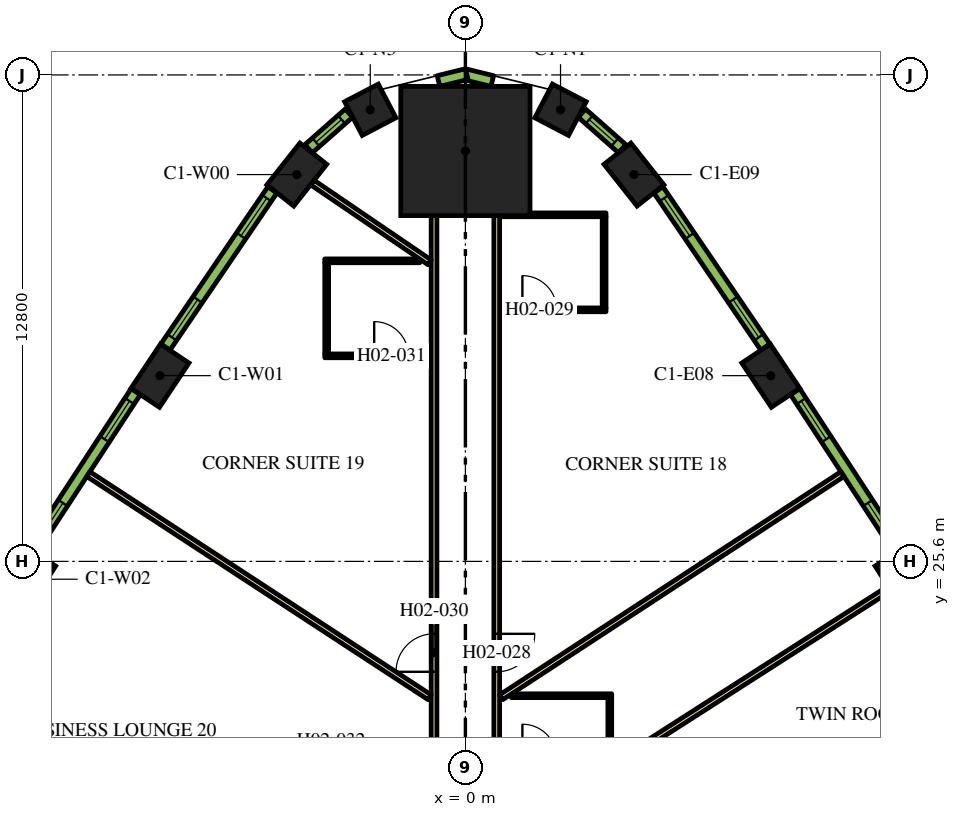
"""IFC4 building model, lengths in metres.
Left out: names, types, materials, properties, quantities, classifications, styles, units other than length and angle.
Written with IfcOpenShell. Run it as: python <this file> out.ifc"""

import sys

from ifc_helpers import new_model, si_unit, direction, frame, frame_2d, origin, origin_2d, place, context, subcontext, project, spatial, rectangle, extrude, element, fill, save


model = new_model("IFC4")
c1 = context("Model", 3, precision=1e-05, world=origin(), true_north=direction((0.0, 1.0)))
c2 = subcontext(c1, "Body", "Model", "MODEL_VIEW")
j1 = project(units=[si_unit("LENGTHUNIT", "METRE"), si_unit("PLANEANGLEUNIT", "RADIAN")], contexts=[c1])
p1 = place(None, origin())
s1 = spatial("IfcSite", under=j1, at=p1, CompositionType="ELEMENT")
p2 = place(p1, origin())
s2 = spatial("IfcBuilding", under=s1, at=p2, CompositionType="ELEMENT")
p3 = place(p2, frame((0.0, 0.0, 43.2)))
s3 = spatial("IfcBuildingStorey", under=s2, at=p3, CompositionType="ELEMENT", Elevation=43.2)
p4 = place(p3, frame((0.0, 36.399, 0.0), z_axis=(0.0, 0.0, 1.0), x_axis=(0.0, 1.0, 0.0)))
e1 = element("IfcColumn", 1, at=p4, inside=s3, PredefinedType="COLUMN", context=c2, shape_type="SweptSolid", body=[
    extrude(rectangle(XDim=3.4, YDim=3.4, at=origin_2d()), origin(), (0.0, 0.0, 1.0), 3.9),
])
for number, where, z_axis, x_axis in (
    (2, (11.539, 25.131, 0.0), (0.0, 0.0, 1.0), (-0.539, 0.842, 0.0)),
    (3, (8.037, 30.487, 0.0), (0.0, 0.0, 1.0), (-0.555, 0.832, 0.0)),
    (4, (4.436, 35.778, 0.0), (0.0, 0.0, 1.0), (-0.62, 0.784, 0.0)),
):
    element("IfcColumn", number, at=place(p3, frame(where, z_axis=z_axis, x_axis=x_axis)), inside=s3, PredefinedType="COLUMN", context=c2, shape_type="SweptSolid", body=[
        extrude(rectangle(XDim=1.4, YDim=0.9, at=origin_2d()), origin(), (0.0, 0.0, 1.0), 3.9),
    ])
for number, where, z_axis, x_axis in (
    (5, (2.503, 37.484, 0.0), (0.0, 0.0, 1.0), (-0.886, 0.464, 0.0)),
    (6, (-2.503, 37.484, 0.0), (0.0, 0.0, 1.0), (-0.886, -0.464, 0.0)),
):
    element("IfcColumn", number, at=place(p3, frame(where, z_axis=z_axis, x_axis=x_axis)), inside=s3, PredefinedType="COLUMN", context=c2, shape_type="SweptSolid", body=[
        extrude(rectangle(XDim=1.0, YDim=1.0, at=origin_2d()), origin(), (0.0, 0.0, 1.0), 3.9),
    ])
for number, where, z_axis, x_axis in (
    (7, (-4.436, 35.778, 0.0), (0.0, 0.0, 1.0), (-0.62, -0.784, 0.0)),
    (8, (-8.037, 30.487, 0.0), (0.0, 0.0, 1.0), (-0.555, -0.832, 0.0)),
    (9, (-11.539, 25.131, 0.0), (0.0, 0.0, 1.0), (-0.539, -0.842, 0.0)),
):
    element("IfcColumn", number, at=place(p3, frame(where, z_axis=z_axis, x_axis=x_axis)), inside=s3, PredefinedType="COLUMN", context=c2, shape_type="SweptSolid", body=[
        extrude(rectangle(XDim=1.4, YDim=0.9, at=origin_2d()), origin(), (0.0, 0.0, 1.0), 3.9),
    ])
p5 = place(p3, frame((0.825, 34.699, 0.0), z_axis=(0.0, 0.0, 1.0), x_axis=(0.0, -1.0, 0.0)))
e10 = element("IfcWall", 10, at=p5, inside=s3, PredefinedType="PARTITIONING", context=c2, shape_type="SweptSolid", body=[
    extrude(rectangle(XDim=16.144, YDim=0.15, at=frame_2d((8.072, 0.0))), origin(), (0.0, 0.0, 1.0), 2.75),
])
p6 = place(p5, frame((14.714, 0.0, 0.0)))
e11 = element("IfcOpeningElement", 11, at=p6, cuts=e10, PredefinedType="OPENING", context=c2, shape_type="SweptSolid", body=[
    extrude(rectangle(XDim=1.0, YDim=2.1, at=frame_2d((0.5, 1.05))), frame((0.0, 0.085, 0.0), z_axis=(0.0, -1.0, 0.0), x_axis=(1.0, 0.0, 0.0)), (0.0, 0.0, 1.0), 0.17),
])
p7 = place(p5, frame((11.005, 0.0, 0.0)))
e12 = element("IfcOpeningElement", 12, at=p7, cuts=e10, PredefinedType="OPENING", context=c2, shape_type="SweptSolid", body=[
    extrude(rectangle(XDim=1.0, YDim=2.1, at=frame_2d((0.5, 1.05))), frame((0.0, 0.085, 0.0), z_axis=(0.0, -1.0, 0.0), x_axis=(1.0, 0.0, 0.0)), (0.0, 0.0, 1.0), 0.17),
])
p8 = place(p3, frame((-0.825, 18.475, 0.0), z_axis=(0.0, 0.0, 1.0), x_axis=(0.0, 1.0, 0.0)))
e13 = element("IfcWall", 13, at=p8, inside=s3, PredefinedType="PARTITIONING", context=c2, shape_type="SweptSolid", body=[
    extrude(rectangle(XDim=16.224, YDim=0.15, at=frame_2d((8.112, 0.0))), origin(), (0.0, 0.0, 1.0), 2.75),
])
p9 = place(p8, frame((4.22, 0.0, 0.0)))
e14 = element("IfcOpeningElement", 14, at=p9, cuts=e13, PredefinedType="OPENING", context=c2, shape_type="SweptSolid", body=[
    extrude(rectangle(XDim=1.0, YDim=2.1, at=frame_2d((0.5, 1.05))), frame((0.0, 0.085, 0.0), z_axis=(0.0, -1.0, 0.0), x_axis=(1.0, 0.0, 0.0)), (0.0, 0.0, 1.0), 0.17),
])
p10 = place(p3, frame((-9.922, 27.896, 0.0), z_axis=(0.0, 0.0, 1.0), x_axis=(0.836970816595, -0.547247523675, 0.0)))
e15 = element("IfcWall", 15, at=p10, inside=s3, PredefinedType="PARTITIONING", context=c2, shape_type="SweptSolid", body=[
    extrude(rectangle(XDim=10.729, YDim=0.15, at=frame_2d((5.364, 0.0))), origin(), (0.0, 0.0, 1.0), 2.75),
])
p11 = place(p3, frame((-4.028, 35.569, 0.0), z_axis=(0.0, 0.0, 1.0), x_axis=(0.826730622998, -0.562597971021, 0.0)))
e16 = element("IfcWall", 16, at=p11, inside=s3, PredefinedType="PARTITIONING", context=c2, shape_type="SweptSolid", body=[
    extrude(rectangle(XDim=3.733, YDim=0.15, at=frame_2d((1.867, 0.0))), origin(), (0.0, 0.0, 1.0), 2.75),
])
p12 = place(p3, frame((9.922, 27.896, 0.0), z_axis=(0.0, 0.0, 1.0), x_axis=(-0.836970816595, -0.547247523675, 0.0)))
e17 = element("IfcWall", 17, at=p12, inside=s3, PredefinedType="PARTITIONING", context=c2, shape_type="SweptSolid", body=[
    extrude(rectangle(XDim=10.729, YDim=0.15, at=frame_2d((5.364, 0.0))), origin(), (0.0, 0.0, 1.0), 2.75),
])
p13 = place(p3, frame((11.16, 24.888, 0.0), z_axis=(0.0, 0.0, 1.0), x_axis=(-0.84199813156, -0.539480441211, 0.0)))
e18 = element("IfcWall", 18, at=p13, inside=s3, PredefinedType="PARTITIONING", context=c2, shape_type="SweptSolid", body=[
    extrude(rectangle(XDim=11.638, YDim=0.15, at=frame_2d((5.819, 0.0))), origin(), (0.0, 0.0, 1.0), 2.75),
])
p14 = place(p3, frame((3.8, 20.466, 0.0), z_axis=(0.0, 0.0, 1.0), x_axis=(0.0, 1.0, 0.0)))
e19 = element("IfcWall", 19, at=p14, inside=s3, PredefinedType="PARTITIONING", context=c2, shape_type="SweptSolid", body=[
    extrude(rectangle(XDim=1.55, YDim=0.1, at=frame_2d((0.775, 0.0))), origin(), (0.0, 0.0, 1.0), 2.75),
])
p15 = place(p3, frame((1.21, 22.066, 0.0), z_axis=(0.0, 0.0, 1.0), x_axis=(1.0, 0.0, 0.0)))
e20 = element("IfcWall", 20, at=p15, inside=s3, PredefinedType="PARTITIONING", context=c2, shape_type="SweptSolid", body=[
    extrude(rectangle(XDim=2.64, YDim=0.1, at=frame_2d((1.32, 0.0))), origin(), (0.0, 0.0, 1.0), 2.75),
])
p16 = place(p3, frame((0.9, 32.219, 0.0), z_axis=(0.0, 0.0, 1.0), x_axis=(1.0, 0.0, 0.0)))
e21 = element("IfcWall", 21, at=p16, inside=s3, PredefinedType="PARTITIONING", context=c2, shape_type="SweptSolid", body=[
    extrude(rectangle(XDim=2.8, YDim=0.1, at=frame_2d((1.4, 0.0))), origin(), (0.0, 0.0, 1.0), 2.75),
])
p17 = place(p16, frame((0.6, 0.0, 0.0)))
e22 = element("IfcOpeningElement", 22, at=p17, cuts=e21, PredefinedType="OPENING", context=c2, shape_type="SweptSolid", body=[
    extrude(rectangle(XDim=0.9, YDim=2.1, at=frame_2d((0.45, 1.05))), frame((0.0, 0.06, 0.0), z_axis=(0.0, -1.0, 0.0), x_axis=(1.0, 0.0, 0.0)), (0.0, 0.0, 1.0), 0.12),
])
p18 = place(p3, frame((3.65, 32.269, 0.0), z_axis=(0.0, 0.0, 1.0), x_axis=(0.0, 1.0, 0.0)))
e23 = element("IfcWall", 23, at=p18, inside=s3, PredefinedType="PARTITIONING", context=c2, shape_type="SweptSolid", body=[
    extrude(rectangle(XDim=2.4, YDim=0.1, at=frame_2d((1.2, 0.0))), origin(), (0.0, 0.0, 1.0), 2.75),
])
p19 = place(p3, frame((0.9, 34.719, 0.0), z_axis=(0.0, 0.0, 1.0), x_axis=(1.0, 0.0, 0.0)))
e24 = element("IfcWall", 24, at=p19, inside=s3, PredefinedType="PARTITIONING", context=c2, shape_type="SweptSolid", body=[
    extrude(rectangle(XDim=2.8, YDim=0.1, at=frame_2d((1.4, 0.0))), origin(), (0.0, 0.0, 1.0), 2.75),
])
p20 = place(p3, frame((-3.7, 31.009, 0.0), z_axis=(0.0, 0.0, 1.0), x_axis=(1.0, 0.0, 0.0)))
e25 = element("IfcWall", 25, at=p20, inside=s3, PredefinedType="PARTITIONING", context=c2, shape_type="SweptSolid", body=[
    extrude(rectangle(XDim=2.8, YDim=0.1, at=frame_2d((1.4, 0.0))), origin(), (0.0, 0.0, 1.0), 2.75),
])
p21 = place(p20, frame((1.3, 0.0, 0.0)))
e26 = element("IfcOpeningElement", 26, at=p21, cuts=e25, PredefinedType="OPENING", context=c2, shape_type="SweptSolid", body=[
    extrude(rectangle(XDim=0.9, YDim=2.1, at=frame_2d((0.45, 1.05))), frame((0.0, 0.06, 0.0), z_axis=(0.0, -1.0, 0.0), x_axis=(1.0, 0.0, 0.0)), (0.0, 0.0, 1.0), 0.12),
])
p22 = place(p3, frame((-3.65, 31.059, 0.0), z_axis=(0.0, 0.0, 1.0), x_axis=(0.0, 1.0, 0.0)))
e27 = element("IfcWall", 27, at=p22, inside=s3, PredefinedType="PARTITIONING", context=c2, shape_type="SweptSolid", body=[
    extrude(rectangle(XDim=2.4, YDim=0.1, at=frame_2d((1.2, 0.0))), origin(), (0.0, 0.0, 1.0), 2.75),
])
p23 = place(p3, frame((-1.2, 33.509, 0.0), z_axis=(0.0, 0.0, 1.0), x_axis=(-1.0, 0.0, 0.0)))
e28 = element("IfcWall", 28, at=p23, inside=s3, PredefinedType="PARTITIONING", context=c2, shape_type="SweptSolid", body=[
    extrude(rectangle(XDim=2.5, YDim=0.1, at=frame_2d((1.25, 0.0))), origin(), (0.0, 0.0, 1.0), 2.75),
])
p24 = place(p3, frame((11.411, 25.884, 0.0), z_axis=(0.0, 0.0, 1.0), x_axis=(-0.547204617628, 0.836998868845, 0.0)))
e29 = element("IfcWall", 29, at=p24, inside=s3, PredefinedType="SOLIDWALL", context=c2, shape_type="SweptSolid", body=[
    extrude(rectangle(XDim=4.998, YDim=0.29, at=frame_2d((2.499, 0.0))), origin(), (0.0, 0.0, 1.0), 3.65),
])
p25 = place(p24, frame((0.297, 0.0, 0.9)))
e30 = element("IfcOpeningElement", 30, at=p25, cuts=e29, PredefinedType="OPENING", context=c2, shape_type="SweptSolid", body=[
    extrude(rectangle(XDim=1.2, YDim=2.15, at=frame_2d((0.6, 1.075))), frame((0.0, 0.155, 0.0), z_axis=(0.0, -1.0, 0.0), x_axis=(1.0, 0.0, 0.0)), (0.0, 0.0, 1.0), 0.31),
])
p26 = place(p24, frame((3.501, 0.0, 0.9)))
e31 = element("IfcOpeningElement", 31, at=p26, cuts=e29, PredefinedType="OPENING", context=c2, shape_type="SweptSolid", body=[
    extrude(rectangle(XDim=1.2, YDim=2.15, at=frame_2d((0.6, 1.075))), frame((0.0, 0.155, 0.0), z_axis=(0.0, -1.0, 0.0), x_axis=(1.0, 0.0, 0.0)), (0.0, 0.0, 1.0), 0.31),
])
p27 = place(p3, frame((7.895, 31.238, 0.0), z_axis=(0.0, 0.0, 1.0), x_axis=(-0.562610153679, 0.826722332454, 0.0)))
e32 = element("IfcWall", 32, at=p27, inside=s3, PredefinedType="SOLIDWALL", context=c2, shape_type="SweptSolid", body=[
    extrude(rectangle(XDim=5.006, YDim=0.29, at=frame_2d((2.503, 0.0))), origin(), (0.0, 0.0, 1.0), 3.65),
])
p28 = place(p27, frame((0.31, 0.0, 0.9)))
e33 = element("IfcOpeningElement", 33, at=p28, cuts=e32, PredefinedType="OPENING", context=c2, shape_type="SweptSolid", body=[
    extrude(rectangle(XDim=1.2, YDim=2.15, at=frame_2d((0.6, 1.075))), frame((0.0, 0.155, 0.0), z_axis=(0.0, -1.0, 0.0), x_axis=(1.0, 0.0, 0.0)), (0.0, 0.0, 1.0), 0.31),
])
p29 = place(p27, frame((3.541, 0.0, 0.9)))
e34 = element("IfcOpeningElement", 34, at=p29, cuts=e32, PredefinedType="OPENING", context=c2, shape_type="SweptSolid", body=[
    extrude(rectangle(XDim=1.2, YDim=2.15, at=frame_2d((0.6, 1.075))), frame((0.0, 0.155, 0.0), z_axis=(0.0, -1.0, 0.0), x_axis=(1.0, 0.0, 0.0)), (0.0, 0.0, 1.0), 0.31),
])
p30 = place(p3, frame((4.125, 36.459, 0.0), z_axis=(0.0, 0.0, 1.0), x_axis=(-0.749812680302, 0.661650167731, 0.0)))
e35 = element("IfcWall", 35, at=p30, inside=s3, PredefinedType="SOLIDWALL", context=c2, shape_type="SweptSolid", body=[
    extrude(rectangle(XDim=1.415, YDim=0.29, at=frame_2d((0.708, 0.0))), origin(), (0.0, 0.0, 1.0), 3.65),
])
p31 = place(p30, frame((0.258, 0.0, 0.9)))
e36 = element("IfcOpeningElement", 36, at=p31, cuts=e35, PredefinedType="OPENING", context=c2, shape_type="SweptSolid", body=[
    extrude(rectangle(XDim=0.9, YDim=2.15, at=frame_2d((0.45, 1.075))), frame((0.0, 0.155, 0.0), z_axis=(0.0, -1.0, 0.0), x_axis=(1.0, 0.0, 0.0)), (0.0, 0.0, 1.0), 0.31),
])
for number, where, z_axis, x_axis in (
    (37, (0.707, 38.239, 0.0), (0.0, 0.0, 1.0), (-0.971, 0.238, 0.0)),
    (38, (0.035, 38.421, 0.0), (0.0, 0.0, 1.0), (-0.971, -0.238, 0.0)),
):
    element("IfcWall", number, at=place(p3, frame(where, z_axis=z_axis, x_axis=x_axis)), inside=s3, PredefinedType="SOLIDWALL", context=c2, shape_type="SweptSolid", body=[
        extrude(rectangle(XDim=0.764, YDim=0.29, at=frame_2d((0.382, 0.0))), origin(), (0.0, 0.0, 1.0), 3.65),
    ])
p32 = place(p3, frame((-3.064, 37.395, 0.0), z_axis=(0.0, 0.0, 1.0), x_axis=(-0.749812680302, -0.661650167731, 0.0)))
e39 = element("IfcWall", 39, at=p32, inside=s3, PredefinedType="SOLIDWALL", context=c2, shape_type="SweptSolid", body=[
    extrude(rectangle(XDim=1.415, YDim=0.29, at=frame_2d((0.708, 0.0))), origin(), (0.0, 0.0, 1.0), 3.65),
])
p33 = place(p32, frame((0.258, 0.0, 0.9)))
e40 = element("IfcOpeningElement", 40, at=p33, cuts=e39, PredefinedType="OPENING", context=c2, shape_type="SweptSolid", body=[
    extrude(rectangle(XDim=0.9, YDim=2.15, at=frame_2d((0.45, 1.075))), frame((0.0, 0.155, 0.0), z_axis=(0.0, -1.0, 0.0), x_axis=(1.0, 0.0, 0.0)), (0.0, 0.0, 1.0), 0.31),
])
p34 = place(p3, frame((-5.078, 35.376, 0.0), z_axis=(0.0, 0.0, 1.0), x_axis=(-0.562610153679, -0.826722332454, 0.0)))
e41 = element("IfcWall", 41, at=p34, inside=s3, PredefinedType="SOLIDWALL", context=c2, shape_type="SweptSolid", body=[
    extrude(rectangle(XDim=5.006, YDim=0.29, at=frame_2d((2.503, 0.0))), origin(), (0.0, 0.0, 1.0), 3.65),
])
p35 = place(p34, frame((0.265, 0.0, 0.9)))
e42 = element("IfcOpeningElement", 42, at=p35, cuts=e41, PredefinedType="OPENING", context=c2, shape_type="SweptSolid", body=[
    extrude(rectangle(XDim=1.2, YDim=2.15, at=frame_2d((0.6, 1.075))), frame((0.0, 0.155, 0.0), z_axis=(0.0, -1.0, 0.0), x_axis=(1.0, 0.0, 0.0)), (0.0, 0.0, 1.0), 0.31),
])
p36 = place(p34, frame((3.495, 0.0, 0.9)))
e43 = element("IfcOpeningElement", 43, at=p36, cuts=e41, PredefinedType="OPENING", context=c2, shape_type="SweptSolid", body=[
    extrude(rectangle(XDim=1.2, YDim=2.15, at=frame_2d((0.6, 1.075))), frame((0.0, 0.155, 0.0), z_axis=(0.0, -1.0, 0.0), x_axis=(1.0, 0.0, 0.0)), (0.0, 0.0, 1.0), 0.31),
])
p37 = place(p3, frame((-8.676, 30.068, 0.0), z_axis=(0.0, 0.0, 1.0), x_axis=(-0.547204617628, -0.836998868845, 0.0)))
e44 = element("IfcWall", 44, at=p37, inside=s3, PredefinedType="SOLIDWALL", context=c2, shape_type="SweptSolid", body=[
    extrude(rectangle(XDim=4.998, YDim=0.29, at=frame_2d((2.499, 0.0))), origin(), (0.0, 0.0, 1.0), 3.65),
])
p38 = place(p37, frame((0.297, 0.0, 0.9)))
e45 = element("IfcOpeningElement", 45, at=p38, cuts=e44, PredefinedType="OPENING", context=c2, shape_type="SweptSolid", body=[
    extrude(rectangle(XDim=1.2, YDim=2.15, at=frame_2d((0.6, 1.075))), frame((0.0, 0.155, 0.0), z_axis=(0.0, -1.0, 0.0), x_axis=(1.0, 0.0, 0.0)), (0.0, 0.0, 1.0), 0.31),
])
p39 = place(p37, frame((3.501, 0.0, 0.9)))
e46 = element("IfcOpeningElement", 46, at=p39, cuts=e44, PredefinedType="OPENING", context=c2, shape_type="SweptSolid", body=[
    extrude(rectangle(XDim=1.2, YDim=2.15, at=frame_2d((0.6, 1.075))), frame((0.0, 0.155, 0.0), z_axis=(0.0, -1.0, 0.0), x_axis=(1.0, 0.0, 0.0)), (0.0, 0.0, 1.0), 0.31),
])
p40 = place(p7, origin())
e47 = element("IfcDoor", 47, at=p40, inside=s3, OperationType="SINGLE_SWING_RIGHT", PredefinedType="DOOR", context=c2, shape_type="SweptSolid", body=[
    extrude(rectangle(XDim=1.0, YDim=2.1, at=frame_2d((0.5, 1.05))), frame((0.0, 0.025, 0.0), z_axis=(0.0, -1.0, 0.0), x_axis=(1.0, 0.0, 0.0)), (0.0, 0.0, 1.0), 0.05),
])
fill(e12, e47)
p41 = place(p17, origin())
e48 = element("IfcDoor", 48, at=p41, inside=s3, OperationType="SINGLE_SWING_RIGHT", PredefinedType="DOOR", context=c2, shape_type="SweptSolid", body=[
    extrude(rectangle(XDim=0.9, YDim=2.1, at=frame_2d((0.45, 1.05))), frame((0.0, 0.025, 0.0), z_axis=(0.0, -1.0, 0.0), x_axis=(1.0, 0.0, 0.0)), (0.0, 0.0, 1.0), 0.05),
])
fill(e22, e48)
p42 = place(p9, origin())
e49 = element("IfcDoor", 49, at=p42, inside=s3, OperationType="SINGLE_SWING_LEFT", PredefinedType="DOOR", context=c2, shape_type="SweptSolid", body=[
    extrude(rectangle(XDim=1.0, YDim=2.1, at=frame_2d((0.5, 1.05))), frame((0.0, 0.025, 0.0), z_axis=(0.0, -1.0, 0.0), x_axis=(1.0, 0.0, 0.0)), (0.0, 0.0, 1.0), 0.05),
])
fill(e14, e49)
p43 = place(p21, origin())
e50 = element("IfcDoor", 50, at=p43, inside=s3, OperationType="SINGLE_SWING_LEFT", PredefinedType="DOOR", context=c2, shape_type="SweptSolid", body=[
    extrude(rectangle(XDim=0.9, YDim=2.1, at=frame_2d((0.45, 1.05))), frame((0.0, 0.025, 0.0), z_axis=(0.0, -1.0, 0.0), x_axis=(1.0, 0.0, 0.0)), (0.0, 0.0, 1.0), 0.05),
])
fill(e26, e50)
p44 = place(p25, origin())
e51 = element("IfcWindow", 51, at=p44, inside=s3, PartitioningType="DOUBLE_PANEL_VERTICAL", PredefinedType="WINDOW", context=c2, shape_type="SweptSolid", body=[
    extrude(rectangle(XDim=1.2, YDim=2.15, at=frame_2d((0.6, 1.075))), frame((0.0, 0.015, 0.0), z_axis=(0.0, -1.0, 0.0), x_axis=(1.0, 0.0, 0.0)), (0.0, 0.0, 1.0), 0.06),
])
fill(e30, e51)
p45 = place(p26, origin())
e52 = element("IfcWindow", 52, at=p45, inside=s3, PartitioningType="DOUBLE_PANEL_VERTICAL", PredefinedType="WINDOW", context=c2, shape_type="SweptSolid", body=[
    extrude(rectangle(XDim=1.2, YDim=2.15, at=frame_2d((0.6, 1.075))), frame((0.0, 0.015, 0.0), z_axis=(0.0, -1.0, 0.0), x_axis=(1.0, 0.0, 0.0)), (0.0, 0.0, 1.0), 0.06),
])
fill(e31, e52)
p46 = place(p28, origin())
e53 = element("IfcWindow", 53, at=p46, inside=s3, PartitioningType="DOUBLE_PANEL_VERTICAL", PredefinedType="WINDOW", context=c2, shape_type="SweptSolid", body=[
    extrude(rectangle(XDim=1.2, YDim=2.15, at=frame_2d((0.6, 1.075))), frame((0.0, 0.015, 0.0), z_axis=(0.0, -1.0, 0.0), x_axis=(1.0, 0.0, 0.0)), (0.0, 0.0, 1.0), 0.06),
])
fill(e33, e53)
p47 = place(p29, origin())
e54 = element("IfcWindow", 54, at=p47, inside=s3, PartitioningType="DOUBLE_PANEL_VERTICAL", PredefinedType="WINDOW", context=c2, shape_type="SweptSolid", body=[
    extrude(rectangle(XDim=1.2, YDim=2.15, at=frame_2d((0.6, 1.075))), frame((0.0, 0.015, 0.0), z_axis=(0.0, -1.0, 0.0), x_axis=(1.0, 0.0, 0.0)), (0.0, 0.0, 1.0), 0.06),
])
fill(e34, e54)
p48 = place(p31, origin())
e55 = element("IfcWindow", 55, at=p48, inside=s3, PartitioningType="SINGLE_PANEL", PredefinedType="WINDOW", context=c2, shape_type="SweptSolid", body=[
    extrude(rectangle(XDim=0.9, YDim=2.15, at=frame_2d((0.45, 1.075))), frame((0.0, 0.015, 0.0), z_axis=(0.0, -1.0, 0.0), x_axis=(1.0, 0.0, 0.0)), (0.0, 0.0, 1.0), 0.06),
])
fill(e36, e55)
p49 = place(p33, origin())
e56 = element("IfcWindow", 56, at=p49, inside=s3, PartitioningType="SINGLE_PANEL", PredefinedType="WINDOW", context=c2, shape_type="SweptSolid", body=[
    extrude(rectangle(XDim=0.9, YDim=2.15, at=frame_2d((0.45, 1.075))), frame((0.0, 0.015, 0.0), z_axis=(0.0, -1.0, 0.0), x_axis=(1.0, 0.0, 0.0)), (0.0, 0.0, 1.0), 0.06),
])
fill(e40, e56)
p50 = place(p35, origin())
e57 = element("IfcWindow", 57, at=p50, inside=s3, PartitioningType="DOUBLE_PANEL_VERTICAL", PredefinedType="WINDOW", context=c2, shape_type="SweptSolid", body=[
    extrude(rectangle(XDim=1.2, YDim=2.15, at=frame_2d((0.6, 1.075))), frame((0.0, 0.015, 0.0), z_axis=(0.0, -1.0, 0.0), x_axis=(1.0, 0.0, 0.0)), (0.0, 0.0, 1.0), 0.06),
])
fill(e42, e57)
p51 = place(p36, origin())
e58 = element("IfcWindow", 58, at=p51, inside=s3, PartitioningType="DOUBLE_PANEL_VERTICAL", PredefinedType="WINDOW", context=c2, shape_type="SweptSolid", body=[
    extrude(rectangle(XDim=1.2, YDim=2.15, at=frame_2d((0.6, 1.075))), frame((0.0, 0.015, 0.0), z_axis=(0.0, -1.0, 0.0), x_axis=(1.0, 0.0, 0.0)), (0.0, 0.0, 1.0), 0.06),
])
fill(e43, e58)
p52 = place(p38, origin())
e59 = element("IfcWindow", 59, at=p52, inside=s3, PartitioningType="DOUBLE_PANEL_VERTICAL", PredefinedType="WINDOW", context=c2, shape_type="SweptSolid", body=[
    extrude(rectangle(XDim=1.2, YDim=2.15, at=frame_2d((0.6, 1.075))), frame((0.0, 0.015, 0.0), z_axis=(0.0, -1.0, 0.0), x_axis=(1.0, 0.0, 0.0)), (0.0, 0.0, 1.0), 0.06),
])
fill(e45, e59)
p53 = place(p39, origin())
e60 = element("IfcWindow", 60, at=p53, inside=s3, PartitioningType="DOUBLE_PANEL_VERTICAL", PredefinedType="WINDOW", context=c2, shape_type="SweptSolid", body=[
    extrude(rectangle(XDim=1.2, YDim=2.15, at=frame_2d((0.6, 1.075))), frame((0.0, 0.015, 0.0), z_axis=(0.0, -1.0, 0.0), x_axis=(1.0, 0.0, 0.0)), (0.0, 0.0, 1.0), 0.06),
])
fill(e46, e60)
save(model, sys.argv[1])
